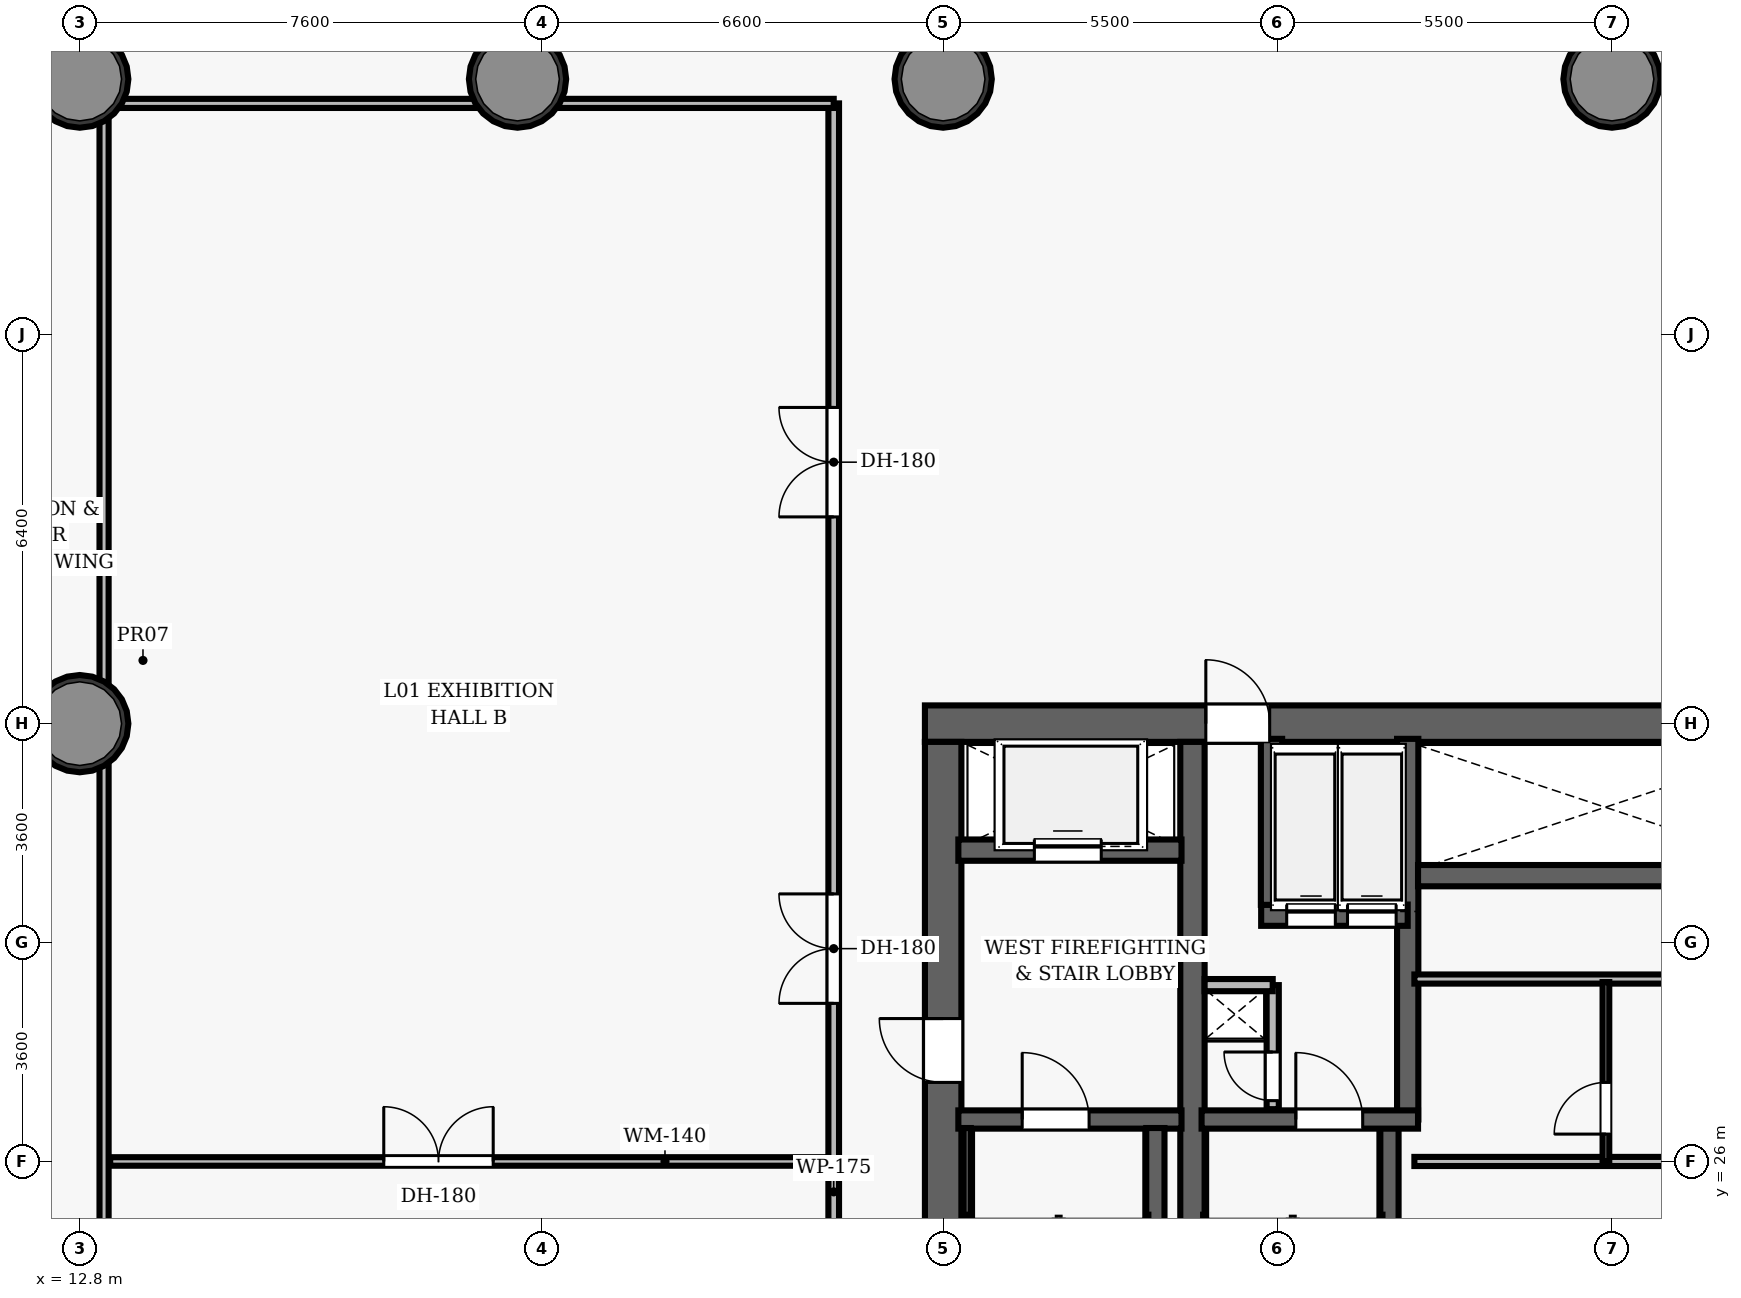
"""IFC4 building model, lengths in metres.
Left out: names, types, materials, properties, quantities, classifications, styles, units other than length and angle.
Written with IfcOpenShell. Run it as: python <this file> out.ifc"""

import sys

from ifc_helpers import new_model, si_unit, direction, frame, frame_2d, origin, origin_2d, place, context, subcontext, project, spatial, rectangle, hollow_circle, extrude, element, fill, save


model = new_model("IFC4")
c1 = context("Model", 3, precision=1e-05, world=origin(), true_north=direction((0.0, 1.0)))
c2 = subcontext(c1, "Body", "Model", "MODEL_VIEW")
j1 = project(units=[si_unit("LENGTHUNIT", "METRE"), si_unit("PLANEANGLEUNIT", "RADIAN")], contexts=[c1])
p1 = place(None, origin())
s1 = spatial("IfcSite", under=j1, at=p1, CompositionType="ELEMENT")
p2 = place(p1, origin())
s2 = spatial("IfcBuilding", under=s1, at=p2, CompositionType="ELEMENT")
p3 = place(p2, frame((0.0, 0.0, 6.6)))
s3 = spatial("IfcBuildingStorey", under=s2, at=p3, CompositionType="ELEMENT", Elevation=6.6)
p4 = place(p3, frame((26.7, 33.2, 0.0), z_axis=(0.0, 0.0, 1.0), x_axis=(1.0, 0.0, 0.0)))
e1 = element("IfcWall", 1, at=p4, inside=s3, PredefinedType="SHEAR", context=c2, shape_type="SweptSolid", body=[
    extrude(rectangle(XDim=22.6, YDim=0.6, at=frame_2d((11.3, 0.0))), origin(), (0.0, 0.0, 1.0), 5.4),
])
p5 = place(p4, frame((4.62, 0.0, 0.0)))
e2 = element("IfcOpeningElement", 2, at=p5, cuts=e1, PredefinedType="OPENING", context=c2, shape_type="SweptSolid", body=[
    extrude(rectangle(XDim=1.05, YDim=2.15, at=frame_2d((0.525, 1.075))), frame((0.0, 0.31, 0.0), z_axis=(0.0, -1.0, 0.0), x_axis=(1.0, 0.0, 0.0)), (0.0, 0.0, 1.0), 0.62),
])
p6 = place(p4, frame((14.52, 0.0, 0.0)))
e3 = element("IfcOpeningElement", 3, at=p6, cuts=e1, PredefinedType="OPENING", context=c2, shape_type="SweptSolid", body=[
    extrude(rectangle(XDim=1.05, YDim=2.15, at=frame_2d((0.525, 1.075))), frame((0.0, 0.31, 0.0), z_axis=(0.0, -1.0, 0.0), x_axis=(1.0, 0.0, 0.0)), (0.0, 0.0, 1.0), 0.62),
])
p7 = place(p3, frame((27.0, 19.1, 0.0), z_axis=(0.0, 0.0, 1.0), x_axis=(0.0, 1.0, 0.0)))
e4 = element("IfcWall", 4, at=p7, inside=s3, PredefinedType="SHEAR", context=c2, shape_type="SweptSolid", body=[
    extrude(rectangle(XDim=13.8, YDim=0.6, at=frame_2d((6.9, 0.0))), origin(), (0.0, 0.0, 1.0), 5.4),
])
p8 = place(p7, frame((8.2, 0.0, 0.0)))
e5 = element("IfcOpeningElement", 5, at=p8, cuts=e4, PredefinedType="OPENING", context=c2, shape_type="SweptSolid", body=[
    extrude(rectangle(XDim=1.05, YDim=2.15, at=frame_2d((0.525, 1.075))), frame((0.0, 0.31, 0.0), z_axis=(0.0, -1.0, 0.0), x_axis=(1.0, 0.0, 0.0)), (0.0, 0.0, 1.0), 0.62),
])
p9 = place(p3, frame((31.1, 19.1, 0.0), z_axis=(0.0, 0.0, 1.0), x_axis=(0.0, 1.0, 0.0)))
e6 = element("IfcWall", 6, at=p9, inside=s3, PredefinedType="SHEAR", context=c2, shape_type="SweptSolid", body=[
    extrude(rectangle(XDim=13.8, YDim=0.4, at=frame_2d((6.9, 0.0))), origin(), (0.0, 0.0, 1.0), 5.4),
])
for number, where, z_axis, x_axis in (
    (7, (12.8, 33.2, 0.0), (0.0, 0.0, 1.0), (1.0, 0.0, 0.0)),
    (8, (12.8, 43.8, 0.0), (0.0, 0.0, 1.0), (1.0, 0.0, 0.0)),
    (9, (20.0, 43.8, 0.0), (0.0, 0.0, 1.0), (1.0, 0.0, 0.0)),
    (10, (27.0, 43.8, 0.0), (0.0, 0.0, 1.0), (1.0, 0.0, 0.0)),
    (11, (38.0, 43.8, 0.0), (0.0, 0.0, 1.0), (1.0, 0.0, 0.0)),
):
    element("IfcColumn", number, at=place(p3, frame(where, z_axis=z_axis, x_axis=x_axis)), inside=s3, PredefinedType="COLUMN", context=c2, shape_type="SweptSolid", body=[
        extrude(hollow_circle(Radius=0.8, WallThickness=0.06, at=origin_2d()), origin(), (0.0, 0.0, 1.0), 5.4),
    ])
p10 = place(p3, frame((27.25, 26.69, 0.0), z_axis=(0.0, 0.0, 1.0), x_axis=(1.0, 0.0, 0.0)))
e12 = element("IfcWall", 12, at=p10, inside=s3, PredefinedType="SHEAR", context=c2, shape_type="SweptSolid", body=[
    extrude(rectangle(XDim=3.67, YDim=0.3, at=frame_2d((1.835, 0.0))), origin(), (0.0, 0.0, 1.0), 5.4),
])
p11 = place(p10, frame((1.05, 0.0, 0.0)))
e13 = element("IfcOpeningElement", 13, at=p11, cuts=e12, PredefinedType="OPENING", context=c2, shape_type="SweptSolid", body=[
    extrude(rectangle(XDim=1.1, YDim=2.15, at=frame_2d((0.55, 1.075))), frame((0.0, 0.16, 0.0), z_axis=(0.0, -1.0, 0.0), x_axis=(1.0, 0.0, 0.0)), (0.0, 0.0, 1.0), 0.32),
])
p12 = place(p3, frame((30.49, 19.05, 0.0), z_axis=(0.0, 0.0, 1.0), x_axis=(0.0, 1.0, 0.0)))
e14 = element("IfcWall", 14, at=p12, inside=s3, PredefinedType="SHEAR", context=c2, shape_type="SweptSolid", body=[
    extrude(rectangle(XDim=7.5, YDim=0.3, at=frame_2d((3.75, 0.0))), origin(), (0.0, 0.0, 1.0), 5.4),
])
p13 = place(p3, frame((27.395, 19.1, 0.0), z_axis=(0.0, 0.0, 1.0), x_axis=(0.0, 1.0, 0.0)))
e15 = element("IfcWall", 15, at=p13, inside=s3, PredefinedType="SHEAR", context=c2, shape_type="SweptSolid", body=[
    extrude(rectangle(XDim=7.45, YDim=0.12, at=frame_2d((3.725, 0.0))), origin(), (0.0, 0.0, 1.0), 5.4),
])
p14 = place(p3, frame((27.25, 31.12, 0.0), z_axis=(0.0, 0.0, 1.0), x_axis=(1.0, 0.0, 0.0)))
e16 = element("IfcWall", 16, at=p14, inside=s3, PredefinedType="SHEAR", context=c2, shape_type="SweptSolid", body=[
    extrude(rectangle(XDim=3.67, YDim=0.35, at=frame_2d((1.835, 0.0))), origin(), (0.0, 0.0, 1.0), 4.11),
])
p15 = place(p14, frame((1.25, 0.0, 0.0)))
e17 = element("IfcOpeningElement", 17, at=p15, cuts=e16, PredefinedType="OPENING", context=c2, shape_type="SweptSolid", body=[
    extrude(rectangle(XDim=1.1, YDim=2.15, at=frame_2d((0.55, 1.075))), frame((0.0, 0.185, 0.0), z_axis=(0.0, -1.0, 0.0), x_axis=(1.0, 0.0, 0.0)), (0.0, 0.0, 1.0), 0.37),
])
p16 = place(p3, frame((34.34, 19.05, 0.0), z_axis=(0.0, 0.0, 1.0), x_axis=(0.0, 1.0, 0.0)))
e18 = element("IfcWall", 18, at=p16, inside=s3, PredefinedType="SHEAR", context=c2, shape_type="SweptSolid", body=[
    extrude(rectangle(XDim=7.5, YDim=0.3, at=frame_2d((3.75, 0.0))), origin(), (0.0, 0.0, 1.0), 5.4),
])
p17 = place(p3, frame((34.64, 26.69, 0.0), z_axis=(0.0, 0.0, 1.0), x_axis=(0.0, 1.0, 0.0)))
e19 = element("IfcWall", 19, at=p17, inside=s3, PredefinedType="SHEAR", context=c2, shape_type="SweptSolid", body=[
    extrude(rectangle(XDim=6.26, YDim=0.35, at=frame_2d((3.13, 0.0))), origin(), (0.0, 0.0, 1.0), 5.4),
])
p18 = place(p3, frame((31.25, 26.69, 0.0), z_axis=(0.0, 0.0, 1.0), x_axis=(1.0, 0.0, 0.0)))
e20 = element("IfcWall", 20, at=p18, inside=s3, PredefinedType="SHEAR", context=c2, shape_type="SweptSolid", body=[
    extrude(rectangle(XDim=3.56, YDim=0.3, at=frame_2d((1.78, 0.0))), origin(), (0.0, 0.0, 1.0), 5.4),
])
p19 = place(p18, frame((1.55, 0.0, 0.0)))
e21 = element("IfcOpeningElement", 21, at=p19, cuts=e20, PredefinedType="OPENING", context=c2, shape_type="SweptSolid", body=[
    extrude(rectangle(XDim=1.1, YDim=2.15, at=frame_2d((0.55, 1.075))), frame((0.0, 0.16, 0.0), z_axis=(0.0, -1.0, 0.0), x_axis=(1.0, 0.0, 0.0)), (0.0, 0.0, 1.0), 0.32),
])
p20 = place(p3, frame((32.23, 30.05, 0.0), z_axis=(0.0, 0.0, 1.0), x_axis=(1.0, 0.0, 0.0)))
e22 = element("IfcWall", 22, at=p20, inside=s3, PredefinedType="SHEAR", context=c2, shape_type="SweptSolid", body=[
    extrude(rectangle(XDim=2.41, YDim=0.35, at=frame_2d((1.205, 0.0))), origin(), (0.0, 0.0, 1.0), 4.11),
])
p21 = place(p20, frame((0.42, 0.0, 0.0)))
e23 = element("IfcOpeningElement", 23, at=p21, cuts=e22, PredefinedType="OPENING", context=c2, shape_type="SweptSolid", body=[
    extrude(rectangle(XDim=0.8, YDim=2.15, at=frame_2d((0.4, 1.075))), frame((0.0, 0.185, 0.0), z_axis=(0.0, -1.0, 0.0), x_axis=(1.0, 0.0, 0.0)), (0.0, 0.0, 1.0), 0.37),
])
p22 = place(p20, frame((1.42, 0.0, 0.0)))
e24 = element("IfcOpeningElement", 24, at=p22, cuts=e22, PredefinedType="OPENING", context=c2, shape_type="SweptSolid", body=[
    extrude(rectangle(XDim=0.8, YDim=2.15, at=frame_2d((0.4, 1.075))), frame((0.0, 0.185, 0.0), z_axis=(0.0, -1.0, 0.0), x_axis=(1.0, 0.0, 0.0)), (0.0, 0.0, 1.0), 0.37),
])
p23 = place(p3, frame((32.4, 30.22, 0.0), z_axis=(0.0, 0.0, 1.0), x_axis=(0.0, 1.0, 0.0)))
e25 = element("IfcWall", 25, at=p23, inside=s3, PredefinedType="SHEAR", context=c2, shape_type="SweptSolid", body=[
    extrude(rectangle(XDim=2.73, YDim=0.35, at=frame_2d((1.365, 0.0))), origin(), (0.0, 0.0, 1.0), 4.11),
])
p24 = place(p3, frame((32.42, 26.86, 0.0), z_axis=(0.0, 0.0, 1.0), x_axis=(0.0, 1.0, 0.0)))
e26 = element("IfcWall", 26, at=p24, inside=s3, PredefinedType="PARTITIONING", context=c2, shape_type="SweptSolid", body=[
    extrude(rectangle(XDim=2.04, YDim=0.2, at=frame_2d((1.02, 0.0))), origin(), (0.0, 0.0, 1.0), 4.11),
])
p25 = place(p24, frame((0.14, 0.0, 0.0)))
e27 = element("IfcOpeningElement", 27, at=p25, cuts=e26, PredefinedType="OPENING", context=c2, shape_type="SweptSolid", body=[
    extrude(rectangle(XDim=0.8, YDim=2.05, at=frame_2d((0.4, 1.025))), frame((0.0, 0.11, 0.0), z_axis=(0.0, -1.0, 0.0), x_axis=(1.0, 0.0, 0.0)), (0.0, 0.0, 1.0), 0.22),
])
p26 = place(p3, frame((31.3, 28.9, 0.0), z_axis=(0.0, 0.0, 1.0), x_axis=(1.0, 0.0, 0.0)))
e28 = element("IfcWall", 28, at=p26, inside=s3, PredefinedType="PARTITIONING", context=c2, shape_type="SweptSolid", body=[
    extrude(rectangle(XDim=1.12, YDim=0.2, at=frame_2d((0.56, 0.0))), origin(), (0.0, 0.0, 1.0), 4.11),
])
p27 = place(p3, frame((34.81, 30.7, 0.0), z_axis=(0.0, 0.0, 1.0), x_axis=(1.0, 0.0, 0.0)))
e29 = element("IfcWall", 29, at=p27, inside=s3, PredefinedType="SHEAR", context=c2, shape_type="SweptSolid", body=[
    extrude(rectangle(XDim=6.36, YDim=0.35, at=frame_2d((3.18, 0.0))), origin(), (0.0, 0.0, 1.0), 4.11),
])
for number, where, z_axis, x_axis in (
    (30, (34.75, 29.0, 0.0), (0.0, 0.0, 1.0), (1.0, 0.0, 0.0)),
    (31, (34.75, 26.0, 0.0), (0.0, 0.0, 1.0), (1.0, 0.0, 0.0)),
):
    element("IfcWall", number, at=place(p3, frame(where, z_axis=z_axis, x_axis=x_axis)), inside=s3, PredefinedType="PARTITIONING", context=c2, shape_type="SweptSolid", body=[
        extrude(rectangle(XDim=6.25, YDim=0.15, at=frame_2d((3.125, 0.0))), origin(), (0.0, 0.0, 1.0), 4.11),
    ])
p28 = place(p3, frame((37.9, 26.0, 0.0), z_axis=(0.0, 0.0, 1.0), x_axis=(0.0, 1.0, 0.0)))
e32 = element("IfcWall", 32, at=p28, inside=s3, PredefinedType="PARTITIONING", context=c2, shape_type="SweptSolid", body=[
    extrude(rectangle(XDim=2.95, YDim=0.11, at=frame_2d((1.475, 0.0))), origin(), (0.0, 0.0, 1.0), 4.11),
])
p29 = place(p28, frame((0.45, 0.0, 0.0)))
e33 = element("IfcOpeningElement", 33, at=p29, cuts=e32, PredefinedType="OPENING", context=c2, shape_type="SweptSolid", body=[
    extrude(rectangle(XDim=0.85, YDim=2.1, at=frame_2d((0.425, 1.05))), frame((0.0, 0.065, 0.0), z_axis=(0.0, -1.0, 0.0), x_axis=(1.0, 0.0, 0.0)), (0.0, 0.0, 1.0), 0.13),
])
p30 = place(p3, frame((25.2, 8.6, 0.0), z_axis=(0.0, 0.0, 1.0), x_axis=(0.0, 1.0, 0.0)))
e34 = element("IfcWall", 34, at=p30, inside=s3, PredefinedType="PARTITIONING", context=c2, shape_type="SweptSolid", body=[
    extrude(rectangle(XDim=34.8, YDim=0.175, at=frame_2d((17.4, 0.0))), origin(), (0.0, 0.0, 1.0), 4.11),
])
p31 = place(p30, frame((4.0, 0.0, 0.0)))
e35 = element("IfcOpeningElement", 35, at=p31, cuts=e34, PredefinedType="OPENING", context=c2, shape_type="SweptSolid", body=[
    extrude(rectangle(XDim=1.8, YDim=2.35, at=frame_2d((0.9, 1.175))), frame((0.0, 0.097, 0.0), z_axis=(0.0, -1.0, 0.0), x_axis=(1.0, 0.0, 0.0)), (0.0, 0.0, 1.0), 0.195),
])
p32 = place(p30, frame((12.0, 0.0, 0.0)))
e36 = element("IfcOpeningElement", 36, at=p32, cuts=e34, PredefinedType="OPENING", context=c2, shape_type="SweptSolid", body=[
    extrude(rectangle(XDim=1.8, YDim=2.35, at=frame_2d((0.9, 1.175))), frame((0.0, 0.097, 0.0), z_axis=(0.0, -1.0, 0.0), x_axis=(1.0, 0.0, 0.0)), (0.0, 0.0, 1.0), 0.195),
])
p33 = place(p30, frame((20.0, 0.0, 0.0)))
e37 = element("IfcOpeningElement", 37, at=p33, cuts=e34, PredefinedType="OPENING", context=c2, shape_type="SweptSolid", body=[
    extrude(rectangle(XDim=1.8, YDim=2.35, at=frame_2d((0.9, 1.175))), frame((0.0, 0.097, 0.0), z_axis=(0.0, -1.0, 0.0), x_axis=(1.0, 0.0, 0.0)), (0.0, 0.0, 1.0), 0.195),
])
p34 = place(p30, frame((28.0, 0.0, 0.0)))
e38 = element("IfcOpeningElement", 38, at=p34, cuts=e34, PredefinedType="OPENING", context=c2, shape_type="SweptSolid", body=[
    extrude(rectangle(XDim=1.8, YDim=2.35, at=frame_2d((0.9, 1.175))), frame((0.0, 0.097, 0.0), z_axis=(0.0, -1.0, 0.0), x_axis=(1.0, 0.0, 0.0)), (0.0, 0.0, 1.0), 0.195),
])
p35 = place(p3, frame((13.2, 43.4, 0.0), z_axis=(0.0, 0.0, 1.0), x_axis=(1.0, 0.0, 0.0)))
e39 = element("IfcWall", 39, at=p35, inside=s3, PredefinedType="PARTITIONING", context=c2, shape_type="SweptSolid", body=[
    extrude(rectangle(XDim=12.0, YDim=0.15, at=frame_2d((6.0, 0.0))), origin(), (0.0, 0.0, 1.0), 4.11),
])
p36 = place(p3, frame((13.2, 8.6, 0.0), z_axis=(0.0, 0.0, 1.0), x_axis=(0.0, 1.0, 0.0)))
e40 = element("IfcWall", 40, at=p36, inside=s3, PredefinedType="PARTITIONING", context=c2, shape_type="SweptSolid", body=[
    extrude(rectangle(XDim=34.8, YDim=0.15, at=frame_2d((17.4, 0.0))), origin(), (0.0, 0.0, 1.0), 4.11),
])
p37 = place(p3, frame((13.3, 26.0, 0.0), z_axis=(0.0, 0.0, 1.0), x_axis=(1.0, 0.0, 0.0)))
e41 = element("IfcWall", 41, at=p37, inside=s3, PredefinedType="MOVABLE", context=c2, shape_type="SweptSolid", body=[
    extrude(rectangle(XDim=11.8, YDim=0.14, at=frame_2d((5.9, 0.0))), origin(), (0.0, 0.0, 1.0), 4.11),
])
p38 = place(p37, frame((4.5, 0.0, 0.0)))
e42 = element("IfcOpeningElement", 42, at=p38, cuts=e41, PredefinedType="OPENING", context=c2, shape_type="SweptSolid", body=[
    extrude(rectangle(XDim=1.8, YDim=2.35, at=frame_2d((0.9, 1.175))), frame((0.0, 0.08, 0.0), z_axis=(0.0, -1.0, 0.0), x_axis=(1.0, 0.0, 0.0)), (0.0, 0.0, 1.0), 0.16),
])
p39 = place(p11, origin())
e43 = element("IfcDoor", 43, at=p39, inside=s3, OperationType="SINGLE_SWING_LEFT", PredefinedType="DOOR", context=c2, shape_type="SweptSolid", body=[
    extrude(rectangle(XDim=1.1, YDim=2.15, at=frame_2d((0.55, 1.075))), frame((0.0, 0.025, 0.0), z_axis=(0.0, -1.0, 0.0), x_axis=(1.0, 0.0, 0.0)), (0.0, 0.0, 1.0), 0.05),
])
fill(e13, e43)
p40 = place(p8, origin())
e44 = element("IfcDoor", 44, at=p40, inside=s3, OperationType="SINGLE_SWING_RIGHT", PredefinedType="DOOR", context=c2, shape_type="SweptSolid", body=[
    extrude(rectangle(XDim=1.05, YDim=2.15, at=frame_2d((0.525, 1.075))), frame((0.0, 0.025, 0.0), z_axis=(0.0, -1.0, 0.0), x_axis=(1.0, 0.0, 0.0)), (0.0, 0.0, 1.0), 0.05),
])
fill(e5, e44)
p41 = place(p19, origin())
e45 = element("IfcDoor", 45, at=p41, inside=s3, OperationType="SINGLE_SWING_LEFT", PredefinedType="DOOR", context=c2, shape_type="SweptSolid", body=[
    extrude(rectangle(XDim=1.1, YDim=2.15, at=frame_2d((0.55, 1.075))), frame((0.0, 0.025, 0.0), z_axis=(0.0, -1.0, 0.0), x_axis=(1.0, 0.0, 0.0)), (0.0, 0.0, 1.0), 0.05),
])
fill(e21, e45)
p42 = place(p25, origin())
e46 = element("IfcDoor", 46, at=p42, inside=s3, OperationType="SINGLE_SWING_RIGHT", PredefinedType="DOOR", context=c2, shape_type="SweptSolid", body=[
    extrude(rectangle(XDim=0.8, YDim=2.05, at=frame_2d((0.4, 1.025))), frame((0.0, 0.025, 0.0), z_axis=(0.0, -1.0, 0.0), x_axis=(1.0, 0.0, 0.0)), (0.0, 0.0, 1.0), 0.05),
])
fill(e27, e46)
p43 = place(p5, origin())
e47 = element("IfcDoor", 47, at=p43, inside=s3, OperationType="SINGLE_SWING_LEFT", PredefinedType="DOOR", context=c2, shape_type="SweptSolid", body=[
    extrude(rectangle(XDim=1.05, YDim=2.15, at=frame_2d((0.525, 1.075))), frame((0.0, 0.025, 0.0), z_axis=(0.0, -1.0, 0.0), x_axis=(1.0, 0.0, 0.0)), (0.0, 0.0, 1.0), 0.05),
])
fill(e2, e47)
p44 = place(p29, origin())
e48 = element("IfcDoor", 48, at=p44, inside=s3, OperationType="SINGLE_SWING_LEFT", PredefinedType="DOOR", context=c2, shape_type="SweptSolid", body=[
    extrude(rectangle(XDim=0.85, YDim=2.1, at=frame_2d((0.425, 1.05))), frame((0.0, 0.025, 0.0), z_axis=(0.0, -1.0, 0.0), x_axis=(1.0, 0.0, 0.0)), (0.0, 0.0, 1.0), 0.05),
])
fill(e33, e48)
p45 = place(p38, origin())
e49 = element("IfcDoor", 49, at=p45, inside=s3, OperationType="DOUBLE_DOOR_SINGLE_SWING", PredefinedType="DOOR", context=c2, shape_type="SweptSolid", body=[
    extrude(rectangle(XDim=1.8, YDim=2.35, at=frame_2d((0.9, 1.175))), frame((0.0, 0.025, 0.0), z_axis=(0.0, -1.0, 0.0), x_axis=(1.0, 0.0, 0.0)), (0.0, 0.0, 1.0), 0.05),
])
fill(e42, e49)
p46 = place(p33, origin())
e50 = element("IfcDoor", 50, at=p46, inside=s3, OperationType="DOUBLE_DOOR_SINGLE_SWING", PredefinedType="DOOR", context=c2, shape_type="SweptSolid", body=[
    extrude(rectangle(XDim=1.8, YDim=2.35, at=frame_2d((0.9, 1.175))), frame((0.0, 0.025, 0.0), z_axis=(0.0, -1.0, 0.0), x_axis=(1.0, 0.0, 0.0)), (0.0, 0.0, 1.0), 0.05),
])
fill(e37, e50)
p47 = place(p34, origin())
e51 = element("IfcDoor", 51, at=p47, inside=s3, OperationType="DOUBLE_DOOR_SINGLE_SWING", PredefinedType="DOOR", context=c2, shape_type="SweptSolid", body=[
    extrude(rectangle(XDim=1.8, YDim=2.35, at=frame_2d((0.9, 1.175))), frame((0.0, 0.025, 0.0), z_axis=(0.0, -1.0, 0.0), x_axis=(1.0, 0.0, 0.0)), (0.0, 0.0, 1.0), 0.05),
])
fill(e38, e51)
p48 = place(p15, origin())
e52 = element("IfcDoor", 52, at=p48, inside=s3, OperationType="SLIDING_TO_LEFT", PredefinedType="DOOR", context=c2, shape_type="SweptSolid", body=[
    extrude(rectangle(XDim=1.1, YDim=2.15, at=frame_2d((0.55, 1.075))), frame((0.0, 0.025, 0.0), z_axis=(0.0, -1.0, 0.0), x_axis=(1.0, 0.0, 0.0)), (0.0, 0.0, 1.0), 0.05),
])
fill(e17, e52)
p49 = place(p21, origin())
e53 = element("IfcDoor", 53, at=p49, inside=s3, OperationType="SLIDING_TO_LEFT", PredefinedType="DOOR", context=c2, shape_type="SweptSolid", body=[
    extrude(rectangle(XDim=0.8, YDim=2.15, at=frame_2d((0.4, 1.075))), frame((0.0, 0.025, 0.0), z_axis=(0.0, -1.0, 0.0), x_axis=(1.0, 0.0, 0.0)), (0.0, 0.0, 1.0), 0.05),
])
fill(e23, e53)
p50 = place(p22, origin())
e54 = element("IfcDoor", 54, at=p50, inside=s3, OperationType="SLIDING_TO_LEFT", PredefinedType="DOOR", context=c2, shape_type="SweptSolid", body=[
    extrude(rectangle(XDim=0.8, YDim=2.15, at=frame_2d((0.4, 1.075))), frame((0.0, 0.025, 0.0), z_axis=(0.0, -1.0, 0.0), x_axis=(1.0, 0.0, 0.0)), (0.0, 0.0, 1.0), 0.05),
])
fill(e24, e54)
save(model, sys.argv[1])
